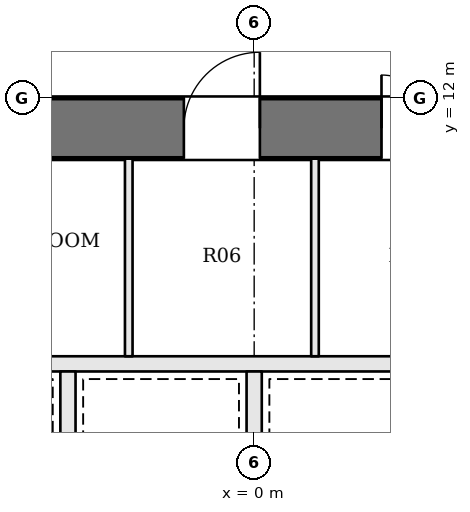
"""IFC4 building model, lengths in metres.
Left out: names, types, materials, properties, quantities, classifications, styles, units other than length and angle.
Written with IfcOpenShell. Run it as: python <this file> out.ifc"""

import sys

from ifc_helpers import new_model, si_unit, direction, frame, frame_2d, origin, place, context, subcontext, project, spatial, rectangle, extrude, element, fill, save


model = new_model("IFC4")
c1 = context("Model", 3, precision=1e-05, world=origin(), true_north=direction((0.0, 1.0)))
c2 = subcontext(c1, "Body", "Model", "MODEL_VIEW")
j1 = project(units=[si_unit("LENGTHUNIT", "METRE"), si_unit("PLANEANGLEUNIT", "RADIAN")], contexts=[c1])
p1 = place(None, origin())
s1 = spatial("IfcSite", under=j1, at=p1, CompositionType="ELEMENT")
p2 = place(p1, origin())
s2 = spatial("IfcBuilding", under=s1, at=p2, CompositionType="ELEMENT")
p3 = place(p2, frame((0.0, 0.0, 209.1)))
s3 = spatial("IfcBuildingStorey", under=s2, at=p3, CompositionType="ELEMENT", Elevation=209.1)
p4 = place(p3, frame((-13.0, 11.6, 0.0), z_axis=(0.0, 0.0, 1.0), x_axis=(1.0, 0.0, 0.0)))
e1 = element("IfcWall", 1, at=p4, inside=s3, PredefinedType="SHEAR", context=c2, shape_type="SweptSolid", body=[
    extrude(rectangle(XDim=26.0, YDim=0.8, at=frame_2d((13.0, 0.0))), origin(), (0.0, 0.0, 1.0), 3.9),
])
p5 = place(p4, frame((9.375, 0.0, 0.0)))
e2 = element("IfcOpeningElement", 2, at=p5, cuts=e1, PredefinedType="OPENING", context=c2, shape_type="SweptSolid", body=[
    extrude(rectangle(XDim=0.7, YDim=2.1, at=frame_2d((0.35, 1.05))), frame((0.0, 0.41, 0.0), z_axis=(0.0, -1.0, 0.0), x_axis=(1.0, 0.0, 0.0)), (0.0, 0.0, 1.0), 0.82),
])
p6 = place(p4, frame((12.075, 0.0, 0.0)))
e3 = element("IfcOpeningElement", 3, at=p6, cuts=e1, PredefinedType="OPENING", context=c2, shape_type="SweptSolid", body=[
    extrude(rectangle(XDim=1.0, YDim=2.1, at=frame_2d((0.5, 1.05))), frame((0.0, 0.41, 0.0), z_axis=(0.0, -1.0, 0.0), x_axis=(1.0, 0.0, 0.0)), (0.0, 0.0, 1.0), 0.82),
])
p7 = place(p4, frame((14.675, 0.0, 0.0)))
e4 = element("IfcOpeningElement", 4, at=p7, cuts=e1, PredefinedType="OPENING", context=c2, shape_type="SweptSolid", body=[
    extrude(rectangle(XDim=0.7, YDim=2.1, at=frame_2d((0.35, 1.05))), frame((0.0, 0.41, 0.0), z_axis=(0.0, -1.0, 0.0), x_axis=(1.0, 0.0, 0.0)), (0.0, 0.0, 1.0), 0.82),
])
p8 = place(p4, frame((16.625, 0.0, 0.0)))
e5 = element("IfcOpeningElement", 5, at=p8, cuts=e1, PredefinedType="OPENING", context=c2, shape_type="SweptSolid", body=[
    extrude(rectangle(XDim=0.9, YDim=2.1, at=frame_2d((0.45, 1.05))), frame((0.0, 0.41, 0.0), z_axis=(0.0, -1.0, 0.0), x_axis=(1.0, 0.0, 0.0)), (0.0, 0.0, 1.0), 0.82),
])
p9 = place(p3, frame((-4.9, 8.5, 0.0), z_axis=(0.0, 0.0, 1.0), x_axis=(1.0, 0.0, 0.0)))
e6 = element("IfcWall", 6, at=p9, inside=s3, PredefinedType="SOLIDWALL", context=c2, shape_type="SweptSolid", body=[
    extrude(rectangle(XDim=9.8, YDim=0.2, at=frame_2d((4.9, 0.0))), origin(), (0.0, 0.0, 1.0), 3.7),
])
for number, where, z_axis, x_axis in (
    (7, (-2.45, 6.2, 0.0), (0.0, 0.0, 1.0), (0.0, 1.0, 0.0)),
    (8, (0.0, 6.2, 0.0), (0.0, 0.0, 1.0), (0.0, 1.0, 0.0)),
):
    element("IfcWall", number, at=place(p3, frame(where, z_axis=z_axis, x_axis=x_axis)), inside=s3, PredefinedType="SOLIDWALL", context=c2, shape_type="SweptSolid", body=[
        extrude(rectangle(XDim=2.2, YDim=0.2, at=frame_2d((1.1, 0.0))), origin(), (0.0, 0.0, 1.0), 3.7),
    ])
for number, where, z_axis, x_axis in (
    (9, (-1.65, 8.6, 0.0), (0.0, 0.0, 1.0), (0.0, 1.0, 0.0)),
    (10, (0.8, 8.6, 0.0), (0.0, 0.0, 1.0), (0.0, 1.0, 0.0)),
):
    element("IfcWall", number, at=place(p3, frame(where, z_axis=z_axis, x_axis=x_axis)), inside=s3, PredefinedType="PARTITIONING", context=c2, shape_type="SweptSolid", body=[
        extrude(rectangle(XDim=2.6, YDim=0.1, at=frame_2d((1.3, 0.0))), origin(), (0.0, 0.0, 1.0), 3.7),
    ])
p10 = place(p6, origin())
e11 = element("IfcDoor", 11, at=p10, inside=s3, OperationType="SINGLE_SWING_RIGHT", PredefinedType="DOOR", context=c2, shape_type="SweptSolid", body=[
    extrude(rectangle(XDim=1.0, YDim=2.1, at=frame_2d((0.5, 1.05))), frame((0.0, 0.025, 0.0), z_axis=(0.0, -1.0, 0.0), x_axis=(1.0, 0.0, 0.0)), (0.0, 0.0, 1.0), 0.05),
])
fill(e3, e11)
p11 = place(p7, origin())
e12 = element("IfcDoor", 12, at=p11, inside=s3, OperationType="SINGLE_SWING_LEFT", PredefinedType="DOOR", context=c2, shape_type="SweptSolid", body=[
    extrude(rectangle(XDim=0.7, YDim=2.1, at=frame_2d((0.35, 1.05))), frame((0.0, 0.025, 0.0), z_axis=(0.0, -1.0, 0.0), x_axis=(1.0, 0.0, 0.0)), (0.0, 0.0, 1.0), 0.05),
])
fill(e4, e12)
save(model, sys.argv[1])
